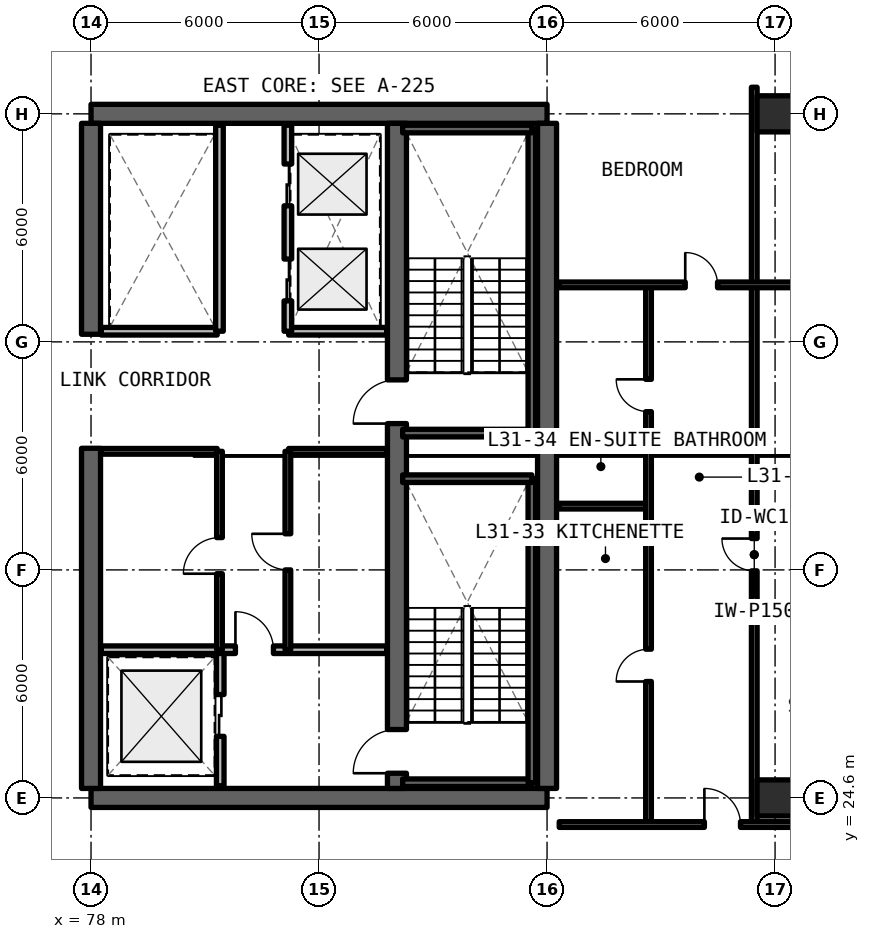
"""IFC4 building model, lengths in metres.
Left out: names, types, materials, properties, quantities, classifications, styles, units other than length and angle.
Written with IfcOpenShell. Run it as: python <this file> out.ifc"""

import sys

from ifc_helpers import new_model, si_unit, direction, frame, frame_2d, origin, origin_2d, place, context, subcontext, project, spatial, rectangle, extrude, element, fill, save


model = new_model("IFC4")
c1 = context("Model", 3, precision=1e-05, world=origin(), true_north=direction((0.0, 1.0)))
c2 = subcontext(c1, "Body", "Model", "MODEL_VIEW")
j1 = project(units=[si_unit("LENGTHUNIT", "METRE"), si_unit("PLANEANGLEUNIT", "RADIAN")], contexts=[c1])
p1 = place(None, origin())
s1 = spatial("IfcSite", under=j1, at=p1, CompositionType="ELEMENT")
p2 = place(p1, origin())
s2 = spatial("IfcBuilding", under=s1, at=p2, CompositionType="ELEMENT")
p3 = place(p2, frame((0.0, 0.0, 112.2)))
s3 = spatial("IfcBuildingStorey", under=s2, at=p3, CompositionType="ELEMENT", Elevation=112.2)
for number, where, z_axis, x_axis in (
    (1, (78.0, 24.6, 0.0), (0.0, 0.0, 1.0), (1.0, 0.0, 0.0)),
    (2, (90.0, 42.6, 0.0), (0.0, 0.0, 1.0), (-1.0, 0.0, 0.0)),
):
    element("IfcWall", number, at=place(p3, frame(where, z_axis=z_axis, x_axis=x_axis)), inside=s3, PredefinedType="SHEAR", context=c2, shape_type="SweptSolid", body=[
        extrude(rectangle(XDim=12.0, YDim=0.5, at=frame_2d((6.0, 0.0))), origin(), (0.0, 0.0, 1.0), 3.63),
    ])
p4 = place(p3, frame((90.0, 24.85, 0.0), z_axis=(0.0, 0.0, 1.0), x_axis=(0.0, 1.0, 0.0)))
e3 = element("IfcWall", 3, at=p4, inside=s3, PredefinedType="SHEAR", context=c2, shape_type="SweptSolid", body=[
    extrude(rectangle(XDim=17.5, YDim=0.5, at=frame_2d((8.75, 0.0))), origin(), (0.0, 0.0, 1.0), 3.63),
])
p5 = place(p3, frame((78.0, 24.85, 0.0), z_axis=(0.0, 0.0, 1.0), x_axis=(0.0, 1.0, 0.0)))
e4 = element("IfcWall", 4, at=p5, inside=s3, PredefinedType="SHEAR", context=c2, shape_type="SweptSolid", body=[
    extrude(rectangle(XDim=8.95, YDim=0.5, at=frame_2d((4.475, 0.0))), origin(), (0.0, 0.0, 1.0), 3.63),
])
p6 = place(p3, frame((78.0, 36.8, 0.0), z_axis=(0.0, 0.0, 1.0), x_axis=(0.0, 1.0, 0.0)))
e5 = element("IfcWall", 5, at=p6, inside=s3, PredefinedType="SHEAR", context=c2, shape_type="SweptSolid", body=[
    extrude(rectangle(XDim=5.55, YDim=0.5, at=frame_2d((2.775, 0.0))), origin(), (0.0, 0.0, 1.0), 3.63),
])
p7 = place(p3, frame((86.05, 24.85, 0.0), z_axis=(0.0, 0.0, 1.0), x_axis=(0.0, 1.0, 0.0)))
e6 = element("IfcWall", 6, at=p7, inside=s3, PredefinedType="SHEAR", context=c2, shape_type="SweptSolid", body=[
    extrude(rectangle(XDim=17.5, YDim=0.5, at=frame_2d((8.75, 0.0))), origin(), (0.0, 0.0, 1.0), 3.63),
])
p8 = place(p7, frame((0.4, 0.0, 0.0)))
e7 = element("IfcOpeningElement", 7, at=p8, cuts=e6, PredefinedType="OPENING", context=c2, shape_type="SweptSolid", body=[
    extrude(rectangle(XDim=1.15, YDim=2.15, at=frame_2d((0.575, 1.075))), frame((0.0, 0.26, 0.0), z_axis=(0.0, -1.0, 0.0), x_axis=(1.0, 0.0, 0.0)), (0.0, 0.0, 1.0), 0.52),
])
p9 = place(p7, frame((9.6, 0.0, 0.0)))
e8 = element("IfcOpeningElement", 8, at=p9, cuts=e6, PredefinedType="OPENING", context=c2, shape_type="SweptSolid", body=[
    extrude(rectangle(XDim=1.15, YDim=2.15, at=frame_2d((0.575, 1.075))), frame((0.0, 0.26, 0.0), z_axis=(0.0, -1.0, 0.0), x_axis=(1.0, 0.0, 0.0)), (0.0, 0.0, 1.0), 0.52),
])
for number, where, z_axis, x_axis in (
    (9, (96.0, 24.6, 0.0), (0.0, 0.0, 1.0), (1.0, 0.0, 0.0)),
    (10, (96.0, 42.6, 0.0), (0.0, 0.0, 1.0), (1.0, 0.0, 0.0)),
):
    element("IfcColumn", number, at=place(p3, frame(where, z_axis=z_axis, x_axis=x_axis)), inside=s3, PredefinedType="COLUMN", context=c2, shape_type="SweptSolid", body=[
        extrude(rectangle(XDim=0.95, YDim=0.95, at=origin_2d()), origin(), (0.0, 0.0, 1.0), 3.63),
    ])
p10 = place(p3, frame((81.4, 24.92, 0.0), z_axis=(0.0, 0.0, 1.0), x_axis=(0.0, 1.0, 0.0)))
e11 = element("IfcWall", 11, at=p10, inside=s3, PredefinedType="SOLIDWALL", context=c2, shape_type="SweptSolid", body=[
    extrude(rectangle(XDim=3.58, YDim=0.2, at=frame_2d((1.79, 0.0))), origin(), (0.0, 0.0, 1.0), 2.63),
])
p11 = place(p10, frame((1.3, 0.0, 0.0)))
e12 = element("IfcOpeningElement", 12, at=p11, cuts=e11, PredefinedType="OPENING", context=c2, shape_type="SweptSolid", body=[
    extrude(rectangle(XDim=1.1, YDim=2.2, at=frame_2d((0.55, 1.1))), frame((0.0, 0.11, 0.0), z_axis=(0.0, -1.0, 0.0), x_axis=(1.0, 0.0, 0.0)), (0.0, 0.0, 1.0), 0.22),
])
p12 = place(p3, frame((78.27, 28.5, 0.0), z_axis=(0.0, 0.0, 1.0), x_axis=(1.0, 0.0, 0.0)))
e13 = element("IfcWall", 13, at=p12, inside=s3, PredefinedType="SOLIDWALL", context=c2, shape_type="SweptSolid", body=[
    extrude(rectangle(XDim=7.51, YDim=0.2, at=frame_2d((3.755, 0.0))), origin(), (0.0, 0.0, 1.0), 2.63),
])
p13 = place(p12, frame((3.53, 0.0, 0.0)))
e14 = element("IfcOpeningElement", 14, at=p13, cuts=e13, PredefinedType="OPENING", context=c2, shape_type="SweptSolid", body=[
    extrude(rectangle(XDim=1.0, YDim=2.15, at=frame_2d((0.5, 1.075))), frame((0.0, 0.11, 0.0), z_axis=(0.0, -1.0, 0.0), x_axis=(1.0, 0.0, 0.0)), (0.0, 0.0, 1.0), 0.22),
])
p14 = place(p3, frame((83.2, 33.72, 0.0), z_axis=(0.0, 0.0, 1.0), x_axis=(1.0, 0.0, 0.0)))
e15 = element("IfcWall", 15, at=p14, inside=s3, PredefinedType="SOLIDWALL", context=c2, shape_type="SweptSolid", body=[
    extrude(rectangle(XDim=2.58, YDim=0.15, at=frame_2d((1.29, 0.0))), origin(), (0.0, 0.0, 1.0), 2.63),
])
p15 = place(p3, frame((83.18, 28.5, 0.0), z_axis=(0.0, 0.0, 1.0), x_axis=(0.0, 1.0, 0.0)))
e16 = element("IfcWall", 16, at=p15, inside=s3, PredefinedType="SOLIDWALL", context=c2, shape_type="SweptSolid", body=[
    extrude(rectangle(XDim=5.22, YDim=0.15, at=frame_2d((2.61, 0.0))), origin(), (0.0, 0.0, 1.0), 2.63),
])
p16 = place(p15, frame((2.1, 0.0, 0.0)))
e17 = element("IfcOpeningElement", 17, at=p16, cuts=e16, PredefinedType="OPENING", context=c2, shape_type="SweptSolid", body=[
    extrude(rectangle(XDim=0.95, YDim=2.15, at=frame_2d((0.475, 1.075))), frame((0.0, 0.085, 0.0), z_axis=(0.0, -1.0, 0.0), x_axis=(1.0, 0.0, 0.0)), (0.0, 0.0, 1.0), 0.17),
])
p17 = place(p3, frame((78.27, 33.72, 0.0), z_axis=(0.0, 0.0, 1.0), x_axis=(1.0, 0.0, 0.0)))
e18 = element("IfcWall", 18, at=p17, inside=s3, PredefinedType="SOLIDWALL", context=c2, shape_type="SweptSolid", body=[
    extrude(rectangle(XDim=3.05, YDim=0.15, at=frame_2d((1.525, 0.0))), origin(), (0.0, 0.0, 1.0), 2.63),
])
p18 = place(p3, frame((81.38, 28.5, 0.0), z_axis=(0.0, 0.0, 1.0), x_axis=(0.0, 1.0, 0.0)))
e19 = element("IfcWall", 19, at=p18, inside=s3, PredefinedType="SOLIDWALL", context=c2, shape_type="SweptSolid", body=[
    extrude(rectangle(XDim=5.22, YDim=0.15, at=frame_2d((2.61, 0.0))), origin(), (0.0, 0.0, 1.0), 2.63),
])
p19 = place(p18, frame((2.0, 0.0, 0.0)))
e20 = element("IfcOpeningElement", 20, at=p19, cuts=e19, PredefinedType="OPENING", context=c2, shape_type="SweptSolid", body=[
    extrude(rectangle(XDim=0.95, YDim=2.15, at=frame_2d((0.475, 1.075))), frame((0.0, 0.085, 0.0), z_axis=(0.0, -1.0, 0.0), x_axis=(1.0, 0.0, 0.0)), (0.0, 0.0, 1.0), 0.17),
])
p20 = place(p3, frame((83.2, 36.88, 0.0), z_axis=(0.0, 0.0, 1.0), x_axis=(1.0, 0.0, 0.0)))
e21 = element("IfcWall", 21, at=p20, inside=s3, PredefinedType="SOLIDWALL", context=c2, shape_type="SweptSolid", body=[
    extrude(rectangle(XDim=2.58, YDim=0.2, at=frame_2d((1.29, 0.0))), origin(), (0.0, 0.0, 1.0), 2.63),
])
p21 = place(p3, frame((83.18, 36.88, 0.0), z_axis=(0.0, 0.0, 1.0), x_axis=(0.0, 1.0, 0.0)))
e22 = element("IfcWall", 22, at=p21, inside=s3, PredefinedType="SOLIDWALL", context=c2, shape_type="SweptSolid", body=[
    extrude(rectangle(XDim=5.42, YDim=0.2, at=frame_2d((2.71, 0.0))), origin(), (0.0, 0.0, 1.0), 2.63),
])
p22 = place(p21, frame((0.8, 0.0, 0.0)))
e23 = element("IfcOpeningElement", 23, at=p22, cuts=e22, PredefinedType="OPENING", context=c2, shape_type="SweptSolid", body=[
    extrude(rectangle(XDim=1.1, YDim=2.2, at=frame_2d((0.55, 1.1))), frame((0.0, 0.11, 0.0), z_axis=(0.0, -1.0, 0.0), x_axis=(1.0, 0.0, 0.0)), (0.0, 0.0, 1.0), 0.22),
])
p23 = place(p21, frame((3.3, 0.0, 0.0)))
e24 = element("IfcOpeningElement", 24, at=p23, cuts=e22, PredefinedType="OPENING", context=c2, shape_type="SweptSolid", body=[
    extrude(rectangle(XDim=1.1, YDim=2.2, at=frame_2d((0.55, 1.1))), frame((0.0, 0.11, 0.0), z_axis=(0.0, -1.0, 0.0), x_axis=(1.0, 0.0, 0.0)), (0.0, 0.0, 1.0), 0.22),
])
p24 = place(p3, frame((78.27, 36.88, 0.0), z_axis=(0.0, 0.0, 1.0), x_axis=(1.0, 0.0, 0.0)))
e25 = element("IfcWall", 25, at=p24, inside=s3, PredefinedType="SOLIDWALL", context=c2, shape_type="SweptSolid", body=[
    extrude(rectangle(XDim=3.05, YDim=0.2, at=frame_2d((1.525, 0.0))), origin(), (0.0, 0.0, 1.0), 2.63),
])
p25 = place(p3, frame((81.38, 36.88, 0.0), z_axis=(0.0, 0.0, 1.0), x_axis=(0.0, 1.0, 0.0)))
e26 = element("IfcWall", 26, at=p25, inside=s3, PredefinedType="SOLIDWALL", context=c2, shape_type="SweptSolid", body=[
    extrude(rectangle(XDim=5.42, YDim=0.2, at=frame_2d((2.71, 0.0))), origin(), (0.0, 0.0, 1.0), 2.63),
])
p26 = place(p3, frame((95.452, 23.9, 0.0), z_axis=(0.0, 0.0, 1.0), x_axis=(0.0, 1.0, 0.0)))
e27 = element("IfcWall", 27, at=p26, inside=s3, PredefinedType="PARTITIONING", context=c2, shape_type="SweptSolid", body=[
    extrude(rectangle(XDim=14.2, YDim=0.15, at=frame_2d((7.1, 0.0))), origin(), (0.0, 0.0, 1.0), 2.63),
])
p27 = place(p26, frame((6.675, 0.0, 0.0)))
e28 = element("IfcOpeningElement", 28, at=p27, cuts=e27, PredefinedType="OPENING", context=c2, shape_type="SweptSolid", body=[
    extrude(rectangle(XDim=0.85, YDim=2.1, at=frame_2d((0.425, 1.05))), frame((0.0, 0.085, 0.0), z_axis=(0.0, -1.0, 0.0), x_axis=(1.0, 0.0, 0.0)), (0.0, 0.0, 1.0), 0.17),
])
p28 = place(p3, frame((90.32, 32.278, 0.0), z_axis=(0.0, 0.0, 1.0), x_axis=(1.0, 0.0, 0.0)))
e29 = element("IfcWall", 29, at=p28, inside=s3, PredefinedType="PARTITIONING", context=c2, shape_type="SweptSolid", body=[
    extrude(rectangle(XDim=2.35, YDim=0.15, at=frame_2d((1.175, 0.0))), origin(), (0.0, 0.0, 1.0), 2.63),
])
p29 = place(p3, frame((92.67, 23.9, 0.0), z_axis=(0.0, 0.0, 1.0), x_axis=(0.0, 1.0, 0.0)))
e30 = element("IfcWall", 30, at=p29, inside=s3, PredefinedType="PARTITIONING", context=c2, shape_type="SweptSolid", body=[
    extrude(rectangle(XDim=14.2, YDim=0.15, at=frame_2d((7.1, 0.0))), origin(), (0.0, 0.0, 1.0), 2.63),
])
p30 = place(p29, frame((3.764, 0.0, 0.0)))
e31 = element("IfcOpeningElement", 31, at=p30, cuts=e30, PredefinedType="OPENING", context=c2, shape_type="SweptSolid", body=[
    extrude(rectangle(XDim=0.85, YDim=2.1, at=frame_2d((0.425, 1.05))), frame((0.0, 0.085, 0.0), z_axis=(0.0, -1.0, 0.0), x_axis=(1.0, 0.0, 0.0)), (0.0, 0.0, 1.0), 0.17),
])
p31 = place(p29, frame((10.864, 0.0, 0.0)))
e32 = element("IfcOpeningElement", 32, at=p31, cuts=e30, PredefinedType="OPENING", context=c2, shape_type="SweptSolid", body=[
    extrude(rectangle(XDim=0.85, YDim=2.1, at=frame_2d((0.425, 1.05))), frame((0.0, 0.085, 0.0), z_axis=(0.0, -1.0, 0.0), x_axis=(1.0, 0.0, 0.0)), (0.0, 0.0, 1.0), 0.17),
])
p32 = place(p3, frame((95.452, 38.1, 0.0), z_axis=(0.0, 0.0, 1.0), x_axis=(0.0, 1.0, 0.0)))
e33 = element("IfcWall", 33, at=p32, inside=s3, PredefinedType="PARTITIONING", context=c2, shape_type="SweptSolid", body=[
    extrude(rectangle(XDim=5.2, YDim=0.15, at=frame_2d((2.6, 0.0))), origin(), (0.0, 0.0, 1.0), 2.63),
])
p33 = place(p3, frame((90.32, 38.1, 0.0), z_axis=(0.0, 0.0, 1.0), x_axis=(1.0, 0.0, 0.0)))
e34 = element("IfcWall", 34, at=p33, inside=s3, PredefinedType="PARTITIONING", context=c2, shape_type="SweptSolid", body=[
    extrude(rectangle(XDim=9.87, YDim=0.15, at=frame_2d((4.935, 0.0))), origin(), (0.0, 0.0, 1.0), 2.63),
])
p34 = place(p33, frame((3.316, 0.0, 0.0)))
e35 = element("IfcOpeningElement", 35, at=p34, cuts=e34, PredefinedType="OPENING", context=c2, shape_type="SweptSolid", body=[
    extrude(rectangle(XDim=0.85, YDim=2.1, at=frame_2d((0.425, 1.05))), frame((0.0, 0.085, 0.0), z_axis=(0.0, -1.0, 0.0), x_axis=(1.0, 0.0, 0.0)), (0.0, 0.0, 1.0), 0.17),
])
p35 = place(p33, frame((7.076, 0.0, 0.0)))
e36 = element("IfcOpeningElement", 36, at=p35, cuts=e34, PredefinedType="OPENING", context=c2, shape_type="SweptSolid", body=[
    extrude(rectangle(XDim=0.85, YDim=2.1, at=frame_2d((0.425, 1.05))), frame((0.0, 0.085, 0.0), z_axis=(0.0, -1.0, 0.0), x_axis=(1.0, 0.0, 0.0)), (0.0, 0.0, 1.0), 0.17),
])
p36 = place(p3, frame((90.32, 23.9, 0.0), z_axis=(0.0, 0.0, 1.0), x_axis=(1.0, 0.0, 0.0)))
e37 = element("IfcWall", 37, at=p36, inside=s3, PredefinedType="SOLIDWALL", context=c2, shape_type="SweptSolid", body=[
    extrude(rectangle(XDim=9.87, YDim=0.15, at=frame_2d((4.935, 0.0))), origin(), (0.0, 0.0, 1.0), 2.63),
])
p37 = place(p36, frame((3.82, 0.0, 0.0)))
e38 = element("IfcOpeningElement", 38, at=p37, cuts=e37, PredefinedType="OPENING", context=c2, shape_type="SweptSolid", body=[
    extrude(rectangle(XDim=0.95, YDim=2.15, at=frame_2d((0.475, 1.075))), frame((0.0, 0.085, 0.0), z_axis=(0.0, -1.0, 0.0), x_axis=(1.0, 0.0, 0.0)), (0.0, 0.0, 1.0), 0.17),
])
p38 = place(p3, frame((86.2, 25.0, 0.0), z_axis=(0.0, 0.0, 1.0), x_axis=(1.0, 0.0, 0.0)))
e39 = element("IfcWall", 39, at=p38, inside=s3, PredefinedType="SOLIDWALL", context=c2, shape_type="SweptSolid", body=[
    extrude(rectangle(XDim=3.4, YDim=0.2, at=frame_2d((1.7, 0.0))), origin(), (0.0, 0.0, 1.0), 3.63),
])
p39 = place(p3, frame((89.6, 25.0, 0.0), z_axis=(0.0, 0.0, 1.0), x_axis=(0.0, 1.0, 0.0)))
e40 = element("IfcWall", 40, at=p39, inside=s3, PredefinedType="SOLIDWALL", context=c2, shape_type="SweptSolid", body=[
    extrude(rectangle(XDim=8.0, YDim=0.2, at=frame_2d((4.0, 0.0))), origin(), (0.0, 0.0, 1.0), 3.63),
])
for number, where, z_axis, x_axis in (
    (41, (89.6, 33.0, 0.0), (0.0, 0.0, 1.0), (-1.0, 0.0, 0.0)),
    (42, (86.2, 34.2, 0.0), (0.0, 0.0, 1.0), (1.0, 0.0, 0.0)),
):
    element("IfcWall", number, at=place(p3, frame(where, z_axis=z_axis, x_axis=x_axis)), inside=s3, PredefinedType="SOLIDWALL", context=c2, shape_type="SweptSolid", body=[
        extrude(rectangle(XDim=3.4, YDim=0.2, at=frame_2d((1.7, 0.0))), origin(), (0.0, 0.0, 1.0), 3.63),
    ])
p40 = place(p3, frame((89.6, 34.2, 0.0), z_axis=(0.0, 0.0, 1.0), x_axis=(0.0, 1.0, 0.0)))
e43 = element("IfcWall", 43, at=p40, inside=s3, PredefinedType="SOLIDWALL", context=c2, shape_type="SweptSolid", body=[
    extrude(rectangle(XDim=8.0, YDim=0.2, at=frame_2d((4.0, 0.0))), origin(), (0.0, 0.0, 1.0), 3.63),
])
p41 = place(p3, frame((89.6, 42.2, 0.0), z_axis=(0.0, 0.0, 1.0), x_axis=(-1.0, 0.0, 0.0)))
e44 = element("IfcWall", 44, at=p41, inside=s3, PredefinedType="SOLIDWALL", context=c2, shape_type="SweptSolid", body=[
    extrude(rectangle(XDim=3.4, YDim=0.2, at=frame_2d((1.7, 0.0))), origin(), (0.0, 0.0, 1.0), 3.63),
])
p42 = place(p11, origin())
e45 = element("IfcDoor", 45, at=p42, inside=s3, OperationType="SLIDING_TO_LEFT", PredefinedType="DOOR", context=c2, shape_type="SweptSolid", body=[
    extrude(rectangle(XDim=1.1, YDim=2.2, at=frame_2d((0.55, 1.1))), frame((0.0, 0.025, 0.0), z_axis=(0.0, -1.0, 0.0), x_axis=(1.0, 0.0, 0.0)), (0.0, 0.0, 1.0), 0.05),
])
fill(e12, e45)
p43 = place(p13, origin())
e46 = element("IfcDoor", 46, at=p43, inside=s3, OperationType="SINGLE_SWING_LEFT", PredefinedType="DOOR", context=c2, shape_type="SweptSolid", body=[
    extrude(rectangle(XDim=1.0, YDim=2.15, at=frame_2d((0.5, 1.075))), frame((0.0, 0.025, 0.0), z_axis=(0.0, -1.0, 0.0), x_axis=(1.0, 0.0, 0.0)), (0.0, 0.0, 1.0), 0.05),
])
fill(e14, e46)
p44 = place(p16, origin())
e47 = element("IfcDoor", 47, at=p44, inside=s3, OperationType="SINGLE_SWING_RIGHT", PredefinedType="DOOR", context=c2, shape_type="SweptSolid", body=[
    extrude(rectangle(XDim=0.95, YDim=2.15, at=frame_2d((0.475, 1.075))), frame((0.0, 0.025, 0.0), z_axis=(0.0, -1.0, 0.0), x_axis=(1.0, 0.0, 0.0)), (0.0, 0.0, 1.0), 0.05),
])
fill(e17, e47)
p45 = place(p19, origin())
e48 = element("IfcDoor", 48, at=p45, inside=s3, OperationType="SINGLE_SWING_LEFT", PredefinedType="DOOR", context=c2, shape_type="SweptSolid", body=[
    extrude(rectangle(XDim=0.95, YDim=2.15, at=frame_2d((0.475, 1.075))), frame((0.0, 0.025, 0.0), z_axis=(0.0, -1.0, 0.0), x_axis=(1.0, 0.0, 0.0)), (0.0, 0.0, 1.0), 0.05),
])
fill(e20, e48)
p46 = place(p22, origin())
e49 = element("IfcDoor", 49, at=p46, inside=s3, OperationType="SLIDING_TO_LEFT", PredefinedType="DOOR", context=c2, shape_type="SweptSolid", body=[
    extrude(rectangle(XDim=1.1, YDim=2.2, at=frame_2d((0.55, 1.1))), frame((0.0, 0.025, 0.0), z_axis=(0.0, -1.0, 0.0), x_axis=(1.0, 0.0, 0.0)), (0.0, 0.0, 1.0), 0.05),
])
fill(e23, e49)
p47 = place(p23, origin())
e50 = element("IfcDoor", 50, at=p47, inside=s3, OperationType="SLIDING_TO_RIGHT", PredefinedType="DOOR", context=c2, shape_type="SweptSolid", body=[
    extrude(rectangle(XDim=1.1, YDim=2.2, at=frame_2d((0.55, 1.1))), frame((0.0, 0.025, 0.0), z_axis=(0.0, -1.0, 0.0), x_axis=(1.0, 0.0, 0.0)), (0.0, 0.0, 1.0), 0.05),
])
fill(e24, e50)
p48 = place(p27, origin())
e51 = element("IfcDoor", 51, at=p48, inside=s3, OperationType="SINGLE_SWING_RIGHT", PredefinedType="DOOR", context=c2, shape_type="SweptSolid", body=[
    extrude(rectangle(XDim=0.85, YDim=2.1, at=frame_2d((0.425, 1.05))), frame((0.0, 0.025, 0.0), z_axis=(0.0, -1.0, 0.0), x_axis=(1.0, 0.0, 0.0)), (0.0, 0.0, 1.0), 0.05),
])
fill(e28, e51)
p49 = place(p30, origin())
e52 = element("IfcDoor", 52, at=p49, inside=s3, OperationType="SINGLE_SWING_LEFT", PredefinedType="DOOR", context=c2, shape_type="SweptSolid", body=[
    extrude(rectangle(XDim=0.85, YDim=2.1, at=frame_2d((0.425, 1.05))), frame((0.0, 0.025, 0.0), z_axis=(0.0, -1.0, 0.0), x_axis=(1.0, 0.0, 0.0)), (0.0, 0.0, 1.0), 0.05),
])
fill(e31, e52)
p50 = place(p31, origin())
e53 = element("IfcDoor", 53, at=p50, inside=s3, OperationType="SINGLE_SWING_RIGHT", PredefinedType="DOOR", context=c2, shape_type="SweptSolid", body=[
    extrude(rectangle(XDim=0.85, YDim=2.1, at=frame_2d((0.425, 1.05))), frame((0.0, 0.025, 0.0), z_axis=(0.0, -1.0, 0.0), x_axis=(1.0, 0.0, 0.0)), (0.0, 0.0, 1.0), 0.05),
])
fill(e32, e53)
p51 = place(p34, origin())
e54 = element("IfcDoor", 54, at=p51, inside=s3, OperationType="SINGLE_SWING_LEFT", PredefinedType="DOOR", context=c2, shape_type="SweptSolid", body=[
    extrude(rectangle(XDim=0.85, YDim=2.1, at=frame_2d((0.425, 1.05))), frame((0.0, 0.025, 0.0), z_axis=(0.0, -1.0, 0.0), x_axis=(1.0, 0.0, 0.0)), (0.0, 0.0, 1.0), 0.05),
])
fill(e35, e54)
p52 = place(p37, origin())
e55 = element("IfcDoor", 55, at=p52, inside=s3, OperationType="SINGLE_SWING_LEFT", PredefinedType="DOOR", context=c2, shape_type="SweptSolid", body=[
    extrude(rectangle(XDim=0.95, YDim=2.15, at=frame_2d((0.475, 1.075))), frame((0.0, 0.025, 0.0), z_axis=(0.0, -1.0, 0.0), x_axis=(1.0, 0.0, 0.0)), (0.0, 0.0, 1.0), 0.05),
])
fill(e38, e55)
p53 = place(p8, origin())
e56 = element("IfcDoor", 56, at=p53, inside=s3, OperationType="SINGLE_SWING_RIGHT", PredefinedType="DOOR", context=c2, shape_type="SweptSolid", body=[
    extrude(rectangle(XDim=1.15, YDim=2.15, at=frame_2d((0.575, 1.075))), frame((0.0, 0.025, 0.0), z_axis=(0.0, -1.0, 0.0), x_axis=(1.0, 0.0, 0.0)), (0.0, 0.0, 1.0), 0.05),
])
fill(e7, e56)
p54 = place(p9, origin())
e57 = element("IfcDoor", 57, at=p54, inside=s3, OperationType="SINGLE_SWING_LEFT", PredefinedType="DOOR", context=c2, shape_type="SweptSolid", body=[
    extrude(rectangle(XDim=1.15, YDim=2.15, at=frame_2d((0.575, 1.075))), frame((0.0, 0.025, 0.0), z_axis=(0.0, -1.0, 0.0), x_axis=(1.0, 0.0, 0.0)), (0.0, 0.0, 1.0), 0.05),
])
fill(e8, e57)
save(model, sys.argv[1])
